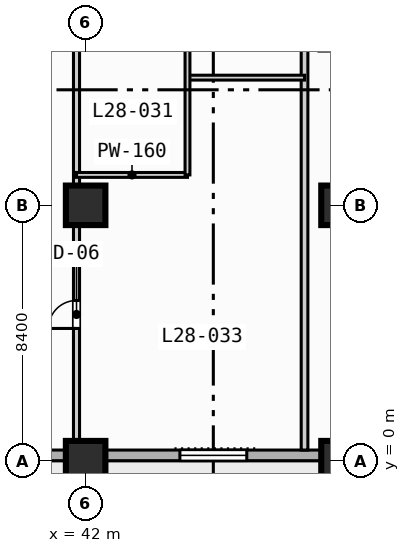
"""IFC4 building model, lengths in metres.
Left out: names, types, materials, properties, quantities, classifications, styles, units other than length and angle.
Written with IfcOpenShell. Run it as: python <this file> out.ifc"""

import sys

from ifc_helpers import new_model, si_unit, direction, frame, frame_2d, origin, origin_2d, place, context, subcontext, project, spatial, rectangle, extrude, element, fill, save


model = new_model("IFC4")
c1 = context("Model", 3, precision=1e-05, world=origin(), true_north=direction((0.0, 1.0)))
c2 = subcontext(c1, "Body", "Model", "MODEL_VIEW")
j1 = project(units=[si_unit("LENGTHUNIT", "METRE"), si_unit("PLANEANGLEUNIT", "RADIAN")], contexts=[c1])
p1 = place(None, origin())
s1 = spatial("IfcSite", under=j1, at=p1, CompositionType="ELEMENT")
p2 = place(p1, origin())
s2 = spatial("IfcBuilding", under=s1, at=p2, CompositionType="ELEMENT")
p3 = place(p2, frame((0.0, 0.0, 119.0)))
s3 = spatial("IfcBuildingStorey", under=s2, at=p3, CompositionType="ELEMENT", Elevation=119.0)
for number, where, z_axis, x_axis in (
    (1, (42.0, 0.0, 0.0), (0.0, 0.0, 1.0), (1.0, 0.0, 0.0)),
    (2, (42.0, 8.4, 0.0), (0.0, 0.0, 1.0), (1.0, 0.0, 0.0)),
    (3, (50.4, 0.0, 0.0), (0.0, 0.0, 1.0), (1.0, 0.0, 0.0)),
    (4, (50.4, 8.4, 0.0), (0.0, 0.0, 1.0), (1.0, 0.0, 0.0)),
):
    element("IfcColumn", number, at=place(p3, frame(where, z_axis=z_axis, x_axis=x_axis)), inside=s3, PredefinedType="COLUMN", context=c2, shape_type="SweptSolid", body=[
        extrude(rectangle(XDim=1.3, YDim=1.3, at=origin_2d()), origin(), (0.0, 0.0, 1.0), 3.8),
    ])
p4 = place(p3, frame((72.425, 0.175, 0.0), z_axis=(0.0, 0.0, 1.0), x_axis=(-1.0, 0.0, 0.0)))
e5 = element("IfcWall", 5, at=p4, inside=s3, PredefinedType="STANDARD", context=c2, shape_type="SweptSolid", body=[
    extrude(rectangle(XDim=69.25, YDim=0.35, at=frame_2d((34.625, 0.0))), origin(), (0.0, 0.0, 1.0), 3.55),
])
p5 = place(p4, frame((50.725, 0.0, 0.0)))
e6 = element("IfcOpeningElement", 6, at=p5, cuts=e5, PredefinedType="OPENING", context=c2, shape_type="SweptSolid", body=[
    extrude(rectangle(XDim=1.4, YDim=2.2, at=frame_2d((0.7, 1.1))), frame((0.0, 0.185, 0.0), z_axis=(0.0, -1.0, 0.0), x_axis=(1.0, 0.0, 0.0)), (0.0, 0.0, 1.0), 0.37),
])
p6 = place(p4, frame((58.725, 0.0, 0.85)))
e7 = element("IfcOpeningElement", 7, at=p6, cuts=e5, PredefinedType="OPENING", context=c2, shape_type="SweptSolid", body=[
    extrude(rectangle(XDim=2.2, YDim=1.8, at=frame_2d((1.1, 0.9))), frame((0.0, 0.185, 0.0), z_axis=(0.0, -1.0, 0.0), x_axis=(1.0, 0.0, 0.0)), (0.0, 0.0, 1.0), 0.37),
])
p7 = place(p4, frame((41.925, 0.0, 0.85)))
e8 = element("IfcOpeningElement", 8, at=p7, cuts=e5, PredefinedType="OPENING", context=c2, shape_type="SweptSolid", body=[
    extrude(rectangle(XDim=2.2, YDim=1.8, at=frame_2d((1.1, 0.9))), frame((0.0, 0.185, 0.0), z_axis=(0.0, -1.0, 0.0), x_axis=(1.0, 0.0, 0.0)), (0.0, 0.0, 1.0), 0.37),
])
p8 = place(p4, frame((33.525, 0.0, 0.85)))
e9 = element("IfcOpeningElement", 9, at=p8, cuts=e5, PredefinedType="OPENING", context=c2, shape_type="SweptSolid", body=[
    extrude(rectangle(XDim=2.2, YDim=1.8, at=frame_2d((1.1, 0.9))), frame((0.0, 0.185, 0.0), z_axis=(0.0, -1.0, 0.0), x_axis=(1.0, 0.0, 0.0)), (0.0, 0.0, 1.0), 0.37),
])
p9 = place(p4, frame((25.125, 0.0, 0.85)))
e10 = element("IfcOpeningElement", 10, at=p9, cuts=e5, PredefinedType="OPENING", context=c2, shape_type="SweptSolid", body=[
    extrude(rectangle(XDim=2.2, YDim=1.8, at=frame_2d((1.1, 0.9))), frame((0.0, 0.185, 0.0), z_axis=(0.0, -1.0, 0.0), x_axis=(1.0, 0.0, 0.0)), (0.0, 0.0, 1.0), 0.37),
])
p10 = place(p4, frame((8.325, 0.0, 0.85)))
e11 = element("IfcOpeningElement", 11, at=p10, cuts=e5, PredefinedType="OPENING", context=c2, shape_type="SweptSolid", body=[
    extrude(rectangle(XDim=2.2, YDim=1.8, at=frame_2d((1.1, 0.9))), frame((0.0, 0.185, 0.0), z_axis=(0.0, -1.0, 0.0), x_axis=(1.0, 0.0, 0.0)), (0.0, 0.0, 1.0), 0.37),
])
p11 = place(p4, frame((2.125, 0.0, 0.85)))
e12 = element("IfcOpeningElement", 12, at=p11, cuts=e5, PredefinedType="OPENING", context=c2, shape_type="SweptSolid", body=[
    extrude(rectangle(XDim=1.8, YDim=1.8, at=frame_2d((0.9, 0.9))), frame((0.0, 0.185, 0.0), z_axis=(0.0, -1.0, 0.0), x_axis=(1.0, 0.0, 0.0)), (0.0, 0.0, 1.0), 0.37),
])
p12 = place(p3, frame((41.7, 0.35, 0.0), z_axis=(0.0, 0.0, 1.0), x_axis=(0.0, 1.0, 0.0)))
e13 = element("IfcWall", 13, at=p12, inside=s3, PredefinedType="PARTITIONING", context=c2, shape_type="SweptSolid", body=[
    extrude(rectangle(XDim=16.25, YDim=0.2, at=frame_2d((8.125, 0.0))), origin(), (0.0, 0.0, 1.0), 2.8),
])
p13 = place(p12, frame((4.0, 0.0, 0.0)))
e14 = element("IfcOpeningElement", 14, at=p13, cuts=e13, PredefinedType="OPENING", context=c2, shape_type="SweptSolid", body=[
    extrude(rectangle(XDim=0.92, YDim=2.1, at=frame_2d((0.46, 1.05))), frame((0.0, 0.11, 0.0), z_axis=(0.0, -1.0, 0.0), x_axis=(1.0, 0.0, 0.0)), (0.0, 0.0, 1.0), 0.22),
])
p14 = place(p12, frame((14.2, 0.0, 0.0)))
e15 = element("IfcOpeningElement", 15, at=p14, cuts=e13, PredefinedType="OPENING", context=c2, shape_type="SweptSolid", body=[
    extrude(rectangle(XDim=0.92, YDim=2.1, at=frame_2d((0.46, 1.05))), frame((0.0, 0.11, 0.0), z_axis=(0.0, -1.0, 0.0), x_axis=(1.0, 0.0, 0.0)), (0.0, 0.0, 1.0), 0.22),
])
p15 = place(p3, frame((49.2, 0.35, 0.0), z_axis=(0.0, 0.0, 1.0), x_axis=(0.0, 1.0, 0.0)))
e16 = element("IfcWall", 16, at=p15, inside=s3, PredefinedType="PARTITIONING", context=c2, shape_type="SweptSolid", body=[
    extrude(rectangle(XDim=16.25, YDim=0.22, at=frame_2d((8.125, 0.0))), origin(), (0.0, 0.0, 1.0), 3.55),
])
p16 = place(p3, frame((41.7, 9.4, 0.0), z_axis=(0.0, 0.0, 1.0), x_axis=(1.0, 0.0, 0.0)))
e17 = element("IfcWall", 17, at=p16, inside=s3, PredefinedType="PARTITIONING", context=c2, shape_type="SweptSolid", body=[
    extrude(rectangle(XDim=3.65, YDim=0.16, at=frame_2d((1.825, 0.0))), origin(), (0.0, 0.0, 1.0), 3.55),
])
p17 = place(p3, frame((45.35, 12.6, 0.0), z_axis=(0.0, 0.0, 1.0), x_axis=(1.0, 0.0, 0.0)))
e18 = element("IfcWall", 18, at=p17, inside=s3, PredefinedType="PARTITIONING", context=c2, shape_type="SweptSolid", body=[
    extrude(rectangle(XDim=3.85, YDim=0.16, at=frame_2d((1.925, 0.0))), origin(), (0.0, 0.0, 1.0), 3.55),
])
p18 = place(p3, frame((45.35, 9.4, 0.0), z_axis=(0.0, 0.0, 1.0), x_axis=(0.0, 1.0, 0.0)))
e19 = element("IfcWall", 19, at=p18, inside=s3, PredefinedType="PARTITIONING", context=c2, shape_type="SweptSolid", body=[
    extrude(rectangle(XDim=7.2, YDim=0.16, at=frame_2d((3.6, 0.0))), origin(), (0.0, 0.0, 1.0), 3.55),
])
p19 = place(p18, frame((4.4, 0.0, 0.0)))
e20 = element("IfcOpeningElement", 20, at=p19, cuts=e19, PredefinedType="OPENING", context=c2, shape_type="SweptSolid", body=[
    extrude(rectangle(XDim=0.9, YDim=2.1, at=frame_2d((0.45, 1.05))), frame((0.0, 0.09, 0.0), z_axis=(0.0, -1.0, 0.0), x_axis=(1.0, 0.0, 0.0)), (0.0, 0.0, 1.0), 0.18),
])
p20 = place(p9, origin())
e21 = element("IfcWindow", 21, at=p20, inside=s3, PartitioningType="SINGLE_PANEL", PredefinedType="WINDOW", context=c2, shape_type="SweptSolid", body=[
    extrude(rectangle(XDim=2.2, YDim=1.8, at=frame_2d((1.1, 0.9))), frame((0.0, 0.03, 0.0), z_axis=(0.0, -1.0, 0.0), x_axis=(1.0, 0.0, 0.0)), (0.0, 0.0, 1.0), 0.06),
])
fill(e10, e21)
p21 = place(p13, origin())
e22 = element("IfcDoor", 22, at=p21, inside=s3, OperationType="SINGLE_SWING_LEFT", PredefinedType="DOOR", context=c2, shape_type="SweptSolid", body=[
    extrude(rectangle(XDim=0.92, YDim=2.1, at=frame_2d((0.46, 1.05))), frame((0.0, 0.025, 0.0), z_axis=(0.0, -1.0, 0.0), x_axis=(1.0, 0.0, 0.0)), (0.0, 0.0, 1.0), 0.05),
])
fill(e14, e22)
save(model, sys.argv[1])
